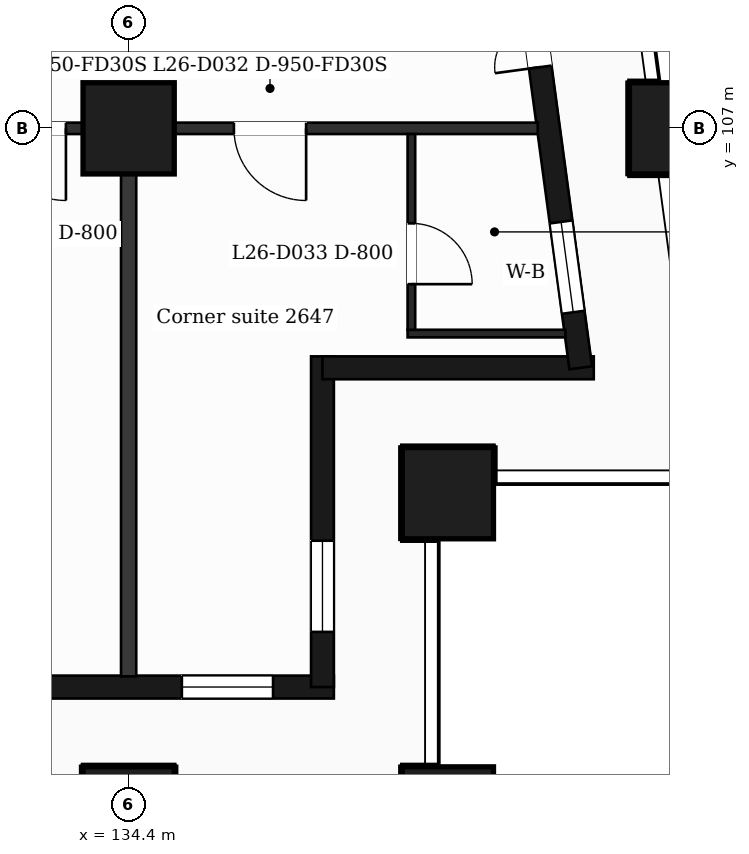
"""IFC4 building model, lengths in metres.
Left out: names, types, materials, properties, quantities, classifications, styles, units other than length and angle.
Written with IfcOpenShell. Run it as: python <this file> out.ifc"""

import sys

from ifc_helpers import new_model, si_unit, direction, frame, frame_2d, origin, origin_2d, place, context, subcontext, project, spatial, rectangle, extrude, element, fill, save


model = new_model("IFC4")
c1 = context("Model", 3, precision=1e-05, world=origin(), true_north=direction((0.0, 1.0)))
c2 = subcontext(c1, "Body", "Model", "MODEL_VIEW")
j1 = project(units=[si_unit("LENGTHUNIT", "METRE"), si_unit("PLANEANGLEUNIT", "RADIAN")], contexts=[c1])
p1 = place(None, origin())
s1 = spatial("IfcSite", under=j1, at=p1, CompositionType="ELEMENT")
p2 = place(p1, origin())
s2 = spatial("IfcBuilding", under=s1, at=p2, CompositionType="ELEMENT")
p3 = place(p2, frame((0.0, 0.0, 113.2)))
s3 = spatial("IfcBuildingStorey", under=s2, at=p3, CompositionType="ELEMENT", Elevation=113.2)
for number, where, z_axis, x_axis in (
    (1, (134.4, 98.0, 0.0), (0.0, 0.0, 1.0), (1.0, 0.0, 0.0)),
    (2, (138.6, 98.0, 0.0), (0.0, 0.0, 1.0), (1.0, 0.0, 0.0)),
    (3, (138.6, 102.2, 0.0), (0.0, 0.0, 1.0), (1.0, 0.0, 0.0)),
    (4, (134.4, 107.0, 0.0), (0.0, 0.0, 1.0), (1.0, 0.0, 0.0)),
    (5, (141.588, 107.0, 0.0), (0.0, 0.0, 1.0), (1.0, 0.0, 0.0)),
):
    element("IfcColumn", number, at=place(p3, frame(where, z_axis=z_axis, x_axis=x_axis)), inside=s3, PredefinedType="COLUMN", context=c2, shape_type="SweptSolid", body=[
        extrude(rectangle(XDim=1.2, YDim=1.2, at=origin_2d()), origin(), (0.0, 0.0, 1.0), 3.7),
    ])
p4 = place(p3, frame((89.85, 99.65, 0.0), z_axis=(0.0, 0.0, 1.0), x_axis=(1.0, 0.0, 0.0)))
e6 = element("IfcWall", 6, at=p4, inside=s3, PredefinedType="SOLIDWALL", context=c2, shape_type="SweptSolid", body=[
    extrude(rectangle(XDim=47.25, YDim=0.3, at=frame_2d((23.625, 0.0))), origin(), (0.0, 0.0, 1.0), 3.38),
])
p5 = place(p4, frame((0.725, 0.0, 0.9)))
e7 = element("IfcOpeningElement", 7, at=p5, cuts=e6, PredefinedType="OPENING", context=c2, shape_type="SweptSolid", body=[
    extrude(rectangle(XDim=1.2, YDim=2.1, at=frame_2d((0.6, 1.05))), frame((0.0, 0.16, 0.0), z_axis=(0.0, -1.0, 0.0), x_axis=(1.0, 0.0, 0.0)), (0.0, 0.0, 1.0), 0.32),
])
p6 = place(p4, frame((3.45, 0.0, 0.9)))
e8 = element("IfcOpeningElement", 8, at=p6, cuts=e6, PredefinedType="OPENING", context=c2, shape_type="SweptSolid", body=[
    extrude(rectangle(XDim=2.4, YDim=2.1, at=frame_2d((1.2, 1.05))), frame((0.0, 0.16, 0.0), z_axis=(0.0, -1.0, 0.0), x_axis=(1.0, 0.0, 0.0)), (0.0, 0.0, 1.0), 0.32),
])
p7 = place(p4, frame((8.25, 0.0, 0.9)))
e9 = element("IfcOpeningElement", 9, at=p7, cuts=e6, PredefinedType="OPENING", context=c2, shape_type="SweptSolid", body=[
    extrude(rectangle(XDim=1.2, YDim=2.1, at=frame_2d((0.6, 1.05))), frame((0.0, 0.16, 0.0), z_axis=(0.0, -1.0, 0.0), x_axis=(1.0, 0.0, 0.0)), (0.0, 0.0, 1.0), 0.32),
])
p8 = place(p4, frame((12.45, 0.0, 0.9)))
e10 = element("IfcOpeningElement", 10, at=p8, cuts=e6, PredefinedType="OPENING", context=c2, shape_type="SweptSolid", body=[
    extrude(rectangle(XDim=1.2, YDim=2.1, at=frame_2d((0.6, 1.05))), frame((0.0, 0.16, 0.0), z_axis=(0.0, -1.0, 0.0), x_axis=(1.0, 0.0, 0.0)), (0.0, 0.0, 1.0), 0.32),
])
p9 = place(p4, frame((16.05, 0.0, 0.9)))
e11 = element("IfcOpeningElement", 11, at=p9, cuts=e6, PredefinedType="OPENING", context=c2, shape_type="SweptSolid", body=[
    extrude(rectangle(XDim=2.4, YDim=2.1, at=frame_2d((1.2, 1.05))), frame((0.0, 0.16, 0.0), z_axis=(0.0, -1.0, 0.0), x_axis=(1.0, 0.0, 0.0)), (0.0, 0.0, 1.0), 0.32),
])
p10 = place(p4, frame((20.25, 0.0, 0.9)))
e12 = element("IfcOpeningElement", 12, at=p10, cuts=e6, PredefinedType="OPENING", context=c2, shape_type="SweptSolid", body=[
    extrude(rectangle(XDim=2.4, YDim=2.1, at=frame_2d((1.2, 1.05))), frame((0.0, 0.16, 0.0), z_axis=(0.0, -1.0, 0.0), x_axis=(1.0, 0.0, 0.0)), (0.0, 0.0, 1.0), 0.32),
])
p11 = place(p4, frame((25.05, 0.0, 0.0)))
e13 = element("IfcOpeningElement", 13, at=p11, cuts=e6, PredefinedType="OPENING", context=c2, shape_type="SweptSolid", body=[
    extrude(rectangle(XDim=1.2, YDim=2.4, at=frame_2d((0.6, 1.2))), frame((0.0, 0.16, 0.0), z_axis=(0.0, -1.0, 0.0), x_axis=(1.0, 0.0, 0.0)), (0.0, 0.0, 1.0), 0.32),
])
p12 = place(p4, frame((28.65, 0.0, 0.9)))
e14 = element("IfcOpeningElement", 14, at=p12, cuts=e6, PredefinedType="OPENING", context=c2, shape_type="SweptSolid", body=[
    extrude(rectangle(XDim=2.4, YDim=2.1, at=frame_2d((1.2, 1.05))), frame((0.0, 0.16, 0.0), z_axis=(0.0, -1.0, 0.0), x_axis=(1.0, 0.0, 0.0)), (0.0, 0.0, 1.0), 0.32),
])
p13 = place(p4, frame((32.85, 0.0, 0.9)))
e15 = element("IfcOpeningElement", 15, at=p13, cuts=e6, PredefinedType="OPENING", context=c2, shape_type="SweptSolid", body=[
    extrude(rectangle(XDim=2.4, YDim=2.1, at=frame_2d((1.2, 1.05))), frame((0.0, 0.16, 0.0), z_axis=(0.0, -1.0, 0.0), x_axis=(1.0, 0.0, 0.0)), (0.0, 0.0, 1.0), 0.32),
])
p14 = place(p4, frame((37.65, 0.0, 0.9)))
e16 = element("IfcOpeningElement", 16, at=p14, cuts=e6, PredefinedType="OPENING", context=c2, shape_type="SweptSolid", body=[
    extrude(rectangle(XDim=1.2, YDim=2.1, at=frame_2d((0.6, 1.05))), frame((0.0, 0.16, 0.0), z_axis=(0.0, -1.0, 0.0), x_axis=(1.0, 0.0, 0.0)), (0.0, 0.0, 1.0), 0.32),
])
p15 = place(p4, frame((41.85, 0.0, 0.9)))
e17 = element("IfcOpeningElement", 17, at=p15, cuts=e6, PredefinedType="OPENING", context=c2, shape_type="SweptSolid", body=[
    extrude(rectangle(XDim=1.2, YDim=2.1, at=frame_2d((0.6, 1.05))), frame((0.0, 0.16, 0.0), z_axis=(0.0, -1.0, 0.0), x_axis=(1.0, 0.0, 0.0)), (0.0, 0.0, 1.0), 0.32),
])
p16 = place(p4, frame((45.25, 0.0, 0.9)))
e18 = element("IfcOpeningElement", 18, at=p16, cuts=e6, PredefinedType="OPENING", context=c2, shape_type="SweptSolid", body=[
    extrude(rectangle(XDim=1.2, YDim=2.1, at=frame_2d((0.6, 1.05))), frame((0.0, 0.16, 0.0), z_axis=(0.0, -1.0, 0.0), x_axis=(1.0, 0.0, 0.0)), (0.0, 0.0, 1.0), 0.32),
])
p17 = place(p3, frame((136.95, 99.65, 0.0), z_axis=(0.0, 0.0, 1.0), x_axis=(0.0, 1.0, 0.0)))
e19 = element("IfcWall", 19, at=p17, inside=s3, PredefinedType="SOLIDWALL", context=c2, shape_type="SweptSolid", body=[
    extrude(rectangle(XDim=4.35, YDim=0.3, at=frame_2d((2.175, 0.0))), origin(), (0.0, 0.0, 1.0), 3.38),
])
p18 = place(p17, frame((0.725, 0.0, 0.9)))
e20 = element("IfcOpeningElement", 20, at=p18, cuts=e19, PredefinedType="OPENING", context=c2, shape_type="SweptSolid", body=[
    extrude(rectangle(XDim=1.2, YDim=2.1, at=frame_2d((0.6, 1.05))), frame((0.0, 0.16, 0.0), z_axis=(0.0, -1.0, 0.0), x_axis=(1.0, 0.0, 0.0)), (0.0, 0.0, 1.0), 0.32),
])
p19 = place(p3, frame((136.95, 103.85, 0.0), z_axis=(0.0, 0.0, 1.0), x_axis=(1.0, 0.0, 0.0)))
e21 = element("IfcWall", 21, at=p19, inside=s3, PredefinedType="SOLIDWALL", context=c2, shape_type="SweptSolid", body=[
    extrude(rectangle(XDim=3.569, YDim=0.3, at=frame_2d((1.785, 0.0))), origin(), (0.0, 0.0, 1.0), 3.38),
])
p20 = place(p3, frame((140.348, 103.85, 0.0), z_axis=(0.0, 0.0, 1.0), x_axis=(-0.133431549479, 0.991058031401, 0.0)))
e22 = element("IfcWall", 22, at=p20, inside=s3, PredefinedType="SOLIDWALL", context=c2, shape_type="SweptSolid", body=[
    extrude(rectangle(XDim=6.609, YDim=0.3, at=frame_2d((3.304, 0.0))), origin(), (0.0, 0.0, 1.0), 3.38),
])
p21 = place(p20, frame((0.737, 0.0, 0.9)))
e23 = element("IfcOpeningElement", 23, at=p21, cuts=e22, PredefinedType="OPENING", context=c2, shape_type="SweptSolid", body=[
    extrude(rectangle(XDim=1.2, YDim=2.1, at=frame_2d((0.6, 1.05))), frame((0.0, 0.16, 0.0), z_axis=(0.0, -1.0, 0.0), x_axis=(1.0, 0.0, 0.0)), (0.0, 0.0, 1.0), 0.32),
])
p22 = place(p20, frame((3.991, 0.0, 0.0)))
e24 = element("IfcOpeningElement", 24, at=p22, cuts=e22, PredefinedType="OPENING", context=c2, shape_type="SweptSolid", body=[
    extrude(rectangle(XDim=1.2, YDim=2.4, at=frame_2d((0.6, 1.2))), frame((0.0, 0.16, 0.0), z_axis=(0.0, -1.0, 0.0), x_axis=(1.0, 0.0, 0.0)), (0.0, 0.0, 1.0), 0.32),
])
p23 = place(p3, frame((138.07, 104.3, 0.0), z_axis=(0.0, 0.0, 1.0), x_axis=(1.0, 0.0, 0.0)))
e25 = element("IfcWall", 25, at=p23, inside=s3, PredefinedType="PARTITIONING", context=c2, shape_type="SweptSolid", body=[
    extrude(rectangle(XDim=2.076, YDim=0.1, at=frame_2d((1.038, 0.0))), origin(), (0.0, 0.0, 1.0), 3.38),
])
p24 = place(p3, frame((87.018, 107.0, 0.0), z_axis=(0.0, 0.0, 1.0), x_axis=(1.0, 0.0, 0.0)))
e26 = element("IfcWall", 26, at=p24, inside=s3, PredefinedType="PARTITIONING", context=c2, shape_type="SweptSolid", body=[
    extrude(rectangle(XDim=52.765, YDim=0.15, at=frame_2d((26.382, 0.0))), origin(), (0.0, 0.0, 1.0), 3.38),
])
p25 = place(p24, frame((1.032, 0.0, 0.0)))
e27 = element("IfcOpeningElement", 27, at=p25, cuts=e26, PredefinedType="OPENING", context=c2, shape_type="SweptSolid", body=[
    extrude(rectangle(XDim=0.95, YDim=2.1, at=frame_2d((0.475, 1.05))), frame((0.0, 0.085, 0.0), z_axis=(0.0, -1.0, 0.0), x_axis=(1.0, 0.0, 0.0)), (0.0, 0.0, 1.0), 0.17),
])
p26 = place(p24, frame((9.752, 0.0, 0.0)))
e28 = element("IfcOpeningElement", 28, at=p26, cuts=e26, PredefinedType="OPENING", context=c2, shape_type="SweptSolid", body=[
    extrude(rectangle(XDim=1.0, YDim=2.1, at=frame_2d((0.5, 1.05))), frame((0.0, 0.085, 0.0), z_axis=(0.0, -1.0, 0.0), x_axis=(1.0, 0.0, 0.0)), (0.0, 0.0, 1.0), 0.17),
])
p27 = place(p24, frame((23.995, 0.0, 0.0)))
e29 = element("IfcOpeningElement", 29, at=p27, cuts=e26, PredefinedType="OPENING", context=c2, shape_type="SweptSolid", body=[
    extrude(rectangle(XDim=0.95, YDim=2.1, at=frame_2d((0.475, 1.05))), frame((0.0, 0.085, 0.0), z_axis=(0.0, -1.0, 0.0), x_axis=(1.0, 0.0, 0.0)), (0.0, 0.0, 1.0), 0.17),
])
p28 = place(p24, frame((28.645, 0.0, 0.0)))
e30 = element("IfcOpeningElement", 30, at=p28, cuts=e26, PredefinedType="OPENING", context=c2, shape_type="SweptSolid", body=[
    extrude(rectangle(XDim=0.95, YDim=2.1, at=frame_2d((0.475, 1.05))), frame((0.0, 0.085, 0.0), z_axis=(0.0, -1.0, 0.0), x_axis=(1.0, 0.0, 0.0)), (0.0, 0.0, 1.0), 0.17),
])
p29 = place(p24, frame((36.632, 0.0, 0.0)))
e31 = element("IfcOpeningElement", 31, at=p29, cuts=e26, PredefinedType="OPENING", context=c2, shape_type="SweptSolid", body=[
    extrude(rectangle(XDim=1.0, YDim=2.1, at=frame_2d((0.5, 1.05))), frame((0.0, 0.085, 0.0), z_axis=(0.0, -1.0, 0.0), x_axis=(1.0, 0.0, 0.0)), (0.0, 0.0, 1.0), 0.17),
])
p30 = place(p24, frame((41.957, 0.0, 0.0)))
e32 = element("IfcOpeningElement", 32, at=p30, cuts=e26, PredefinedType="OPENING", context=c2, shape_type="SweptSolid", body=[
    extrude(rectangle(XDim=0.95, YDim=2.1, at=frame_2d((0.475, 1.05))), frame((0.0, 0.085, 0.0), z_axis=(0.0, -1.0, 0.0), x_axis=(1.0, 0.0, 0.0)), (0.0, 0.0, 1.0), 0.17),
])
p31 = place(p24, frame((45.607, 0.0, 0.0)))
e33 = element("IfcOpeningElement", 33, at=p31, cuts=e26, PredefinedType="OPENING", context=c2, shape_type="SweptSolid", body=[
    extrude(rectangle(XDim=0.95, YDim=2.1, at=frame_2d((0.475, 1.05))), frame((0.0, 0.085, 0.0), z_axis=(0.0, -1.0, 0.0), x_axis=(1.0, 0.0, 0.0)), (0.0, 0.0, 1.0), 0.17),
])
p32 = place(p24, frame((48.767, 0.0, 0.0)))
e34 = element("IfcOpeningElement", 34, at=p32, cuts=e26, PredefinedType="OPENING", context=c2, shape_type="SweptSolid", body=[
    extrude(rectangle(XDim=0.95, YDim=2.1, at=frame_2d((0.475, 1.05))), frame((0.0, 0.085, 0.0), z_axis=(0.0, -1.0, 0.0), x_axis=(1.0, 0.0, 0.0)), (0.0, 0.0, 1.0), 0.17),
])
p33 = place(p3, frame((134.4, 99.79, 0.0), z_axis=(0.0, 0.0, 1.0), x_axis=(0.0, 1.0, 0.0)))
e35 = element("IfcWall", 35, at=p33, inside=s3, PredefinedType="PARTITIONING", context=c2, shape_type="SweptSolid", body=[
    extrude(rectangle(XDim=7.135, YDim=0.2, at=frame_2d((3.567, 0.0))), origin(), (0.0, 0.0, 1.0), 3.38),
])
p34 = place(p3, frame((138.12, 104.35, 0.0), z_axis=(0.0, 0.0, 1.0), x_axis=(0.0, 1.0, 0.0)))
e36 = element("IfcWall", 36, at=p34, inside=s3, PredefinedType="PARTITIONING", context=c2, shape_type="SweptSolid", body=[
    extrude(rectangle(XDim=2.575, YDim=0.1, at=frame_2d((1.288, 0.0))), origin(), (0.0, 0.0, 1.0), 3.38),
])
p35 = place(p34, frame((0.6, 0.0, 0.0)))
e37 = element("IfcOpeningElement", 37, at=p35, cuts=e36, PredefinedType="OPENING", context=c2, shape_type="SweptSolid", body=[
    extrude(rectangle(XDim=0.8, YDim=2.1, at=frame_2d((0.4, 1.05))), frame((0.0, 0.06, 0.0), z_axis=(0.0, -1.0, 0.0), x_axis=(1.0, 0.0, 0.0)), (0.0, 0.0, 1.0), 0.12),
])
p36 = place(p16, origin())
e38 = element("IfcWindow", 38, at=p36, inside=s3, PartitioningType="SINGLE_PANEL", PredefinedType="WINDOW", context=c2, shape_type="SweptSolid", body=[
    extrude(rectangle(XDim=1.2, YDim=2.1, at=frame_2d((0.6, 1.05))), frame((0.0, 0.03, 0.0), z_axis=(0.0, -1.0, 0.0), x_axis=(1.0, 0.0, 0.0)), (0.0, 0.0, 1.0), 0.06),
])
fill(e18, e38)
p37 = place(p18, origin())
e39 = element("IfcWindow", 39, at=p37, inside=s3, PartitioningType="SINGLE_PANEL", PredefinedType="WINDOW", context=c2, shape_type="SweptSolid", body=[
    extrude(rectangle(XDim=1.2, YDim=2.1, at=frame_2d((0.6, 1.05))), frame((0.0, 0.03, 0.0), z_axis=(0.0, -1.0, 0.0), x_axis=(1.0, 0.0, 0.0)), (0.0, 0.0, 1.0), 0.06),
])
fill(e20, e39)
p38 = place(p21, origin())
e40 = element("IfcWindow", 40, at=p38, inside=s3, PartitioningType="SINGLE_PANEL", PredefinedType="WINDOW", context=c2, shape_type="SweptSolid", body=[
    extrude(rectangle(XDim=1.2, YDim=2.1, at=frame_2d((0.6, 1.05))), frame((0.0, 0.03, 0.0), z_axis=(0.0, -1.0, 0.0), x_axis=(1.0, 0.0, 0.0)), (0.0, 0.0, 1.0), 0.06),
])
fill(e23, e40)
p39 = place(p22, origin())
e41 = element("IfcDoor", 41, at=p39, inside=s3, OperationType="DOUBLE_DOOR_SINGLE_SWING", PredefinedType="DOOR", context=c2, shape_type="SweptSolid", body=[
    extrude(rectangle(XDim=1.2, YDim=2.4, at=frame_2d((0.6, 1.2))), frame((0.0, 0.025, 0.0), z_axis=(0.0, -1.0, 0.0), x_axis=(1.0, 0.0, 0.0)), (0.0, 0.0, 1.0), 0.05),
])
fill(e24, e41)
p40 = place(p31, origin())
e42 = element("IfcDoor", 42, at=p40, inside=s3, OperationType="SINGLE_SWING_RIGHT", PredefinedType="DOOR", context=c2, shape_type="SweptSolid", body=[
    extrude(rectangle(XDim=0.95, YDim=2.1, at=frame_2d((0.475, 1.05))), frame((0.0, 0.025, 0.0), z_axis=(0.0, -1.0, 0.0), x_axis=(1.0, 0.0, 0.0)), (0.0, 0.0, 1.0), 0.05),
])
fill(e33, e42)
p41 = place(p32, origin())
e43 = element("IfcDoor", 43, at=p41, inside=s3, OperationType="SINGLE_SWING_RIGHT", PredefinedType="DOOR", context=c2, shape_type="SweptSolid", body=[
    extrude(rectangle(XDim=0.95, YDim=2.1, at=frame_2d((0.475, 1.05))), frame((0.0, 0.025, 0.0), z_axis=(0.0, -1.0, 0.0), x_axis=(1.0, 0.0, 0.0)), (0.0, 0.0, 1.0), 0.05),
])
fill(e34, e43)
p42 = place(p35, origin())
e44 = element("IfcDoor", 44, at=p42, inside=s3, OperationType="SINGLE_SWING_LEFT", PredefinedType="DOOR", context=c2, shape_type="SweptSolid", body=[
    extrude(rectangle(XDim=0.8, YDim=2.1, at=frame_2d((0.4, 1.05))), frame((0.0, 0.025, 0.0), z_axis=(0.0, -1.0, 0.0), x_axis=(1.0, 0.0, 0.0)), (0.0, 0.0, 1.0), 0.05),
])
fill(e37, e44)
save(model, sys.argv[1])
